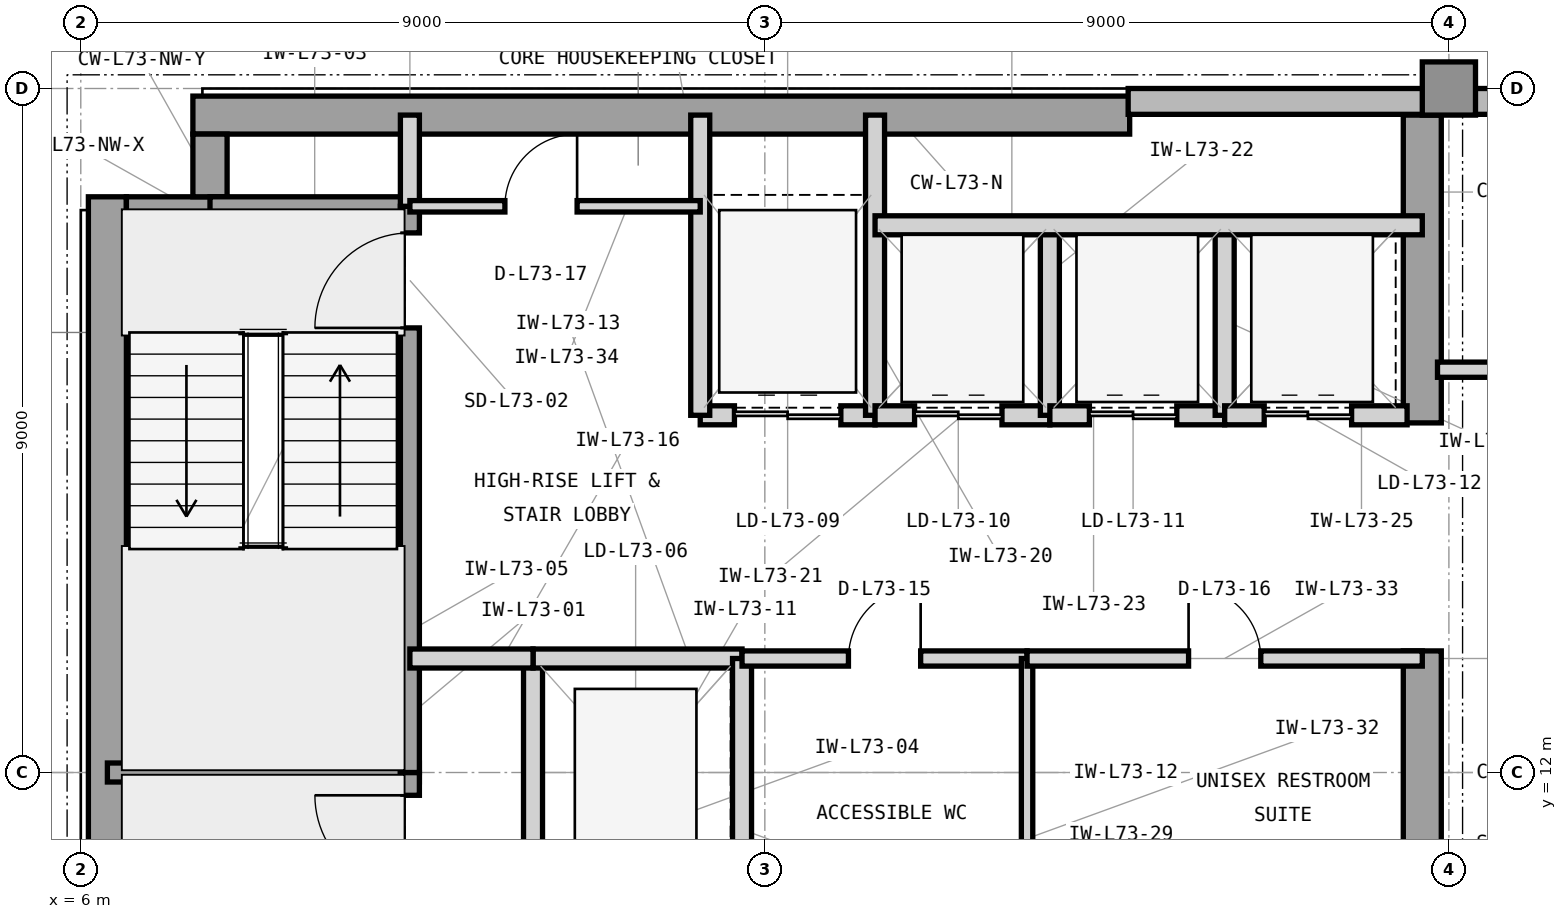
"""IFC4 building model, lengths in metres.
Left out: names, types, materials, properties, quantities, classifications, styles, units other than length and angle.
Written with IfcOpenShell. Run it as: python <this file> out.ifc"""

import sys

from ifc_helpers import new_model, si_unit, direction, frame, frame_2d, origin, origin_2d, place, context, subcontext, project, spatial, rectangle, extrude, element, fill, save


model = new_model("IFC4")
c1 = context("Model", 3, precision=1e-05, world=origin(), true_north=direction((0.0, 1.0)))
c2 = subcontext(c1, "Body", "Model", "MODEL_VIEW")
j1 = project(units=[si_unit("LENGTHUNIT", "METRE"), si_unit("PLANEANGLEUNIT", "RADIAN")], contexts=[c1])
p1 = place(None, origin())
s1 = spatial("IfcSite", under=j1, at=p1, CompositionType="ELEMENT")
p2 = place(p1, origin())
s2 = spatial("IfcBuilding", under=s1, at=p2, CompositionType="ELEMENT")
p3 = place(p2, frame((0.0, 0.0, 297.6)))
s3 = spatial("IfcBuildingStorey", under=s2, at=p3, CompositionType="ELEMENT", Elevation=297.6)
p4 = place(p3, frame((6.35, 4.425, 0.0), z_axis=(0.0, 0.0, 1.0), x_axis=(0.0, 1.0, 0.0)))
e1 = element("IfcWall", 1, at=p4, inside=s3, PredefinedType="SHEAR", context=c2, shape_type="SweptSolid", body=[
    extrude(rectangle(XDim=15.15, YDim=0.5, at=frame_2d((7.575, 0.0))), origin(), (0.0, 0.0, 1.0), 3.9),
])
p5 = place(p3, frame((7.475, 20.65, 0.0), z_axis=(0.0, 0.0, 1.0), x_axis=(1.0, 0.0, 0.0)))
e2 = element("IfcWall", 2, at=p5, inside=s3, PredefinedType="SHEAR", context=c2, shape_type="SweptSolid", body=[
    extrude(rectangle(XDim=12.325, YDim=0.5, at=frame_2d((6.163, 0.0))), origin(), (0.0, 0.0, 1.0), 3.9),
])
p6 = place(p3, frame((23.65, 10.4, 0.0), z_axis=(0.0, 0.0, 1.0), x_axis=(0.0, 1.0, 0.0)))
e3 = element("IfcWall", 3, at=p6, inside=s3, PredefinedType="SHEAR", context=c2, shape_type="SweptSolid", body=[
    extrude(rectangle(XDim=3.2, YDim=0.5, at=frame_2d((1.6, 0.0))), origin(), (0.0, 0.0, 1.0), 3.9),
])
p7 = place(p3, frame((23.65, 16.6, 0.0), z_axis=(0.0, 0.0, 1.0), x_axis=(0.0, 1.0, 0.0)))
e4 = element("IfcWall", 4, at=p7, inside=s3, PredefinedType="SHEAR", context=c2, shape_type="SweptSolid", body=[
    extrude(rectangle(XDim=4.05, YDim=0.5, at=frame_2d((2.025, 0.0))), origin(), (0.0, 0.0, 1.0), 3.9),
])
p8 = place(p3, frame((6.6, 19.35, 0.0), z_axis=(0.0, 0.0, 1.0), x_axis=(1.0, 0.0, 0.0)))
e5 = element("IfcWall", 5, at=p8, inside=s3, PredefinedType="SHEAR", context=c2, shape_type="SweptSolid", body=[
    extrude(rectangle(XDim=1.325, YDim=0.45, at=frame_2d((0.663, 0.0))), origin(), (0.0, 0.0, 1.0), 3.9),
])
p9 = place(p3, frame((7.7, 19.575, 0.0), z_axis=(0.0, 0.0, 1.0), x_axis=(0.0, 1.0, 0.0)))
e6 = element("IfcWall", 6, at=p9, inside=s3, PredefinedType="SHEAR", context=c2, shape_type="SweptSolid", body=[
    extrude(rectangle(XDim=0.825, YDim=0.45, at=frame_2d((0.413, 0.0))), origin(), (0.0, 0.0, 1.0), 3.9),
])
p10 = place(p3, frame((24.0, 21.0, 0.0), z_axis=(0.0, 0.0, 1.0), x_axis=(1.0, 0.0, 0.0)))
e7 = element("IfcColumn", 7, at=p10, inside=s3, PredefinedType="COLUMN", context=c2, shape_type="SweptSolid", body=[
    extrude(rectangle(XDim=0.7, YDim=0.7, at=origin_2d()), origin(), (0.0, 0.0, 1.0), 3.9),
])
p11 = place(p3, frame((49.4, 20.83, 0.0), z_axis=(0.0, 0.0, 1.0), x_axis=(-1.0, 0.0, 0.0)))
e8 = element("IfcWall", 8, at=p11, inside=s3, PredefinedType="STANDARD", context=c2, shape_type="SweptSolid", body=[
    extrude(rectangle(XDim=29.62, YDim=0.34, at=frame_2d((14.81, 0.0))), origin(), (0.0, 0.0, 1.0), 3.715),
])
p12 = place(p11, frame((11.042, 0.0, 0.8)))
e9 = element("IfcOpeningElement", 9, at=p12, cuts=e8, PredefinedType="OPENING", context=c2, shape_type="SweptSolid", body=[
    extrude(rectangle(XDim=2.6, YDim=2.35, at=frame_2d((1.3, 1.175))), frame((0.0, 0.18, 0.0), z_axis=(0.0, -1.0, 0.0), x_axis=(1.0, 0.0, 0.0)), (0.0, 0.0, 1.0), 0.36),
])
p13 = place(p11, frame((20.915, 0.0, 0.8)))
e10 = element("IfcOpeningElement", 10, at=p13, cuts=e8, PredefinedType="OPENING", context=c2, shape_type="SweptSolid", body=[
    extrude(rectangle(XDim=2.6, YDim=2.35, at=frame_2d((1.3, 1.175))), frame((0.0, 0.18, 0.0), z_axis=(0.0, -1.0, 0.0), x_axis=(1.0, 0.0, 0.0)), (0.0, 0.0, 1.0), 0.36),
])
p14 = place(p11, frame((8.375, 0.0, 0.8)))
e11 = element("IfcOpeningElement", 11, at=p14, cuts=e8, PredefinedType="OPENING", context=c2, shape_type="SweptSolid", body=[
    extrude(rectangle(XDim=1.2, YDim=2.35, at=frame_2d((0.6, 1.175))), frame((0.0, 0.18, 0.0), z_axis=(0.0, -1.0, 0.0), x_axis=(1.0, 0.0, 0.0)), (0.0, 0.0, 1.0), 0.36),
])
p15 = place(p3, frame((6.35, 12.0, 0.0), z_axis=(0.0, 0.0, 1.0), x_axis=(1.0, 0.0, 0.0)))
e12 = element("IfcWall", 12, at=p15, inside=s3, PredefinedType="SHEAR", context=c2, shape_type="SweptSolid", body=[
    extrude(rectangle(XDim=4.105, YDim=0.25, at=frame_2d((2.052, 0.0))), origin(), (0.0, 0.0, 1.0), 3.9),
])
p16 = place(p3, frame((7.7, 19.45, 0.0), z_axis=(0.0, 0.0, 1.0), x_axis=(1.0, 0.0, 0.0)))
e13 = element("IfcWall", 13, at=p16, inside=s3, PredefinedType="SHEAR", context=c2, shape_type="SweptSolid", body=[
    extrude(rectangle(XDim=2.755, YDim=0.25, at=frame_2d((1.377, 0.0))), origin(), (0.0, 0.0, 1.0), 3.9),
])
p17 = place(p3, frame((10.33, 4.55, 0.0), z_axis=(0.0, 0.0, 1.0), x_axis=(0.0, 1.0, 0.0)))
e14 = element("IfcWall", 14, at=p17, inside=s3, PredefinedType="SHEAR", context=c2, shape_type="SweptSolid", body=[
    extrude(rectangle(XDim=7.45, YDim=0.25, at=frame_2d((3.725, 0.0))), origin(), (0.0, 0.0, 1.0), 3.9),
])
p18 = place(p17, frame((5.9, 0.0, 0.0)))
e15 = element("IfcOpeningElement", 15, at=p18, cuts=e14, PredefinedType="OPENING", context=c2, shape_type="SweptSolid", body=[
    extrude(rectangle(XDim=1.25, YDim=2.2, at=frame_2d((0.625, 1.1))), frame((0.0, 0.135, 0.0), z_axis=(0.0, -1.0, 0.0), x_axis=(1.0, 0.0, 0.0)), (0.0, 0.0, 1.0), 0.27),
])
p19 = place(p3, frame((10.33, 12.0, 0.0), z_axis=(0.0, 0.0, 1.0), x_axis=(0.0, 1.0, 0.0)))
e16 = element("IfcWall", 16, at=p19, inside=s3, PredefinedType="SHEAR", context=c2, shape_type="SweptSolid", body=[
    extrude(rectangle(XDim=7.45, YDim=0.25, at=frame_2d((3.725, 0.0))), origin(), (0.0, 0.0, 1.0), 3.9),
])
p20 = place(p19, frame((5.85, 0.0, 0.0)))
e17 = element("IfcOpeningElement", 17, at=p20, cuts=e16, PredefinedType="OPENING", context=c2, shape_type="SweptSolid", body=[
    extrude(rectangle(XDim=1.25, YDim=2.2, at=frame_2d((0.625, 1.1))), frame((0.0, 0.135, 0.0), z_axis=(0.0, -1.0, 0.0), x_axis=(1.0, 0.0, 0.0)), (0.0, 0.0, 1.0), 0.27),
])
p21 = place(p3, frame((10.33, 19.45, 0.0), z_axis=(0.0, 0.0, 1.0), x_axis=(0.0, 1.0, 0.0)))
e18 = element("IfcWall", 18, at=p21, inside=s3, PredefinedType="PARTITIONING", context=c2, shape_type="SweptSolid", body=[
    extrude(rectangle(XDim=1.2, YDim=0.25, at=frame_2d((0.6, 0.0))), origin(), (0.0, 0.0, 1.0), 3.705),
])
p22 = place(p3, frame((11.95, 10.5, 0.0), z_axis=(0.0, 0.0, 1.0), x_axis=(0.0, 1.0, 0.0)))
e19 = element("IfcWall", 19, at=p22, inside=s3, PredefinedType="PARTITIONING", context=c2, shape_type="SweptSolid", body=[
    extrude(rectangle(XDim=3.0, YDim=0.25, at=frame_2d((1.5, 0.0))), origin(), (0.0, 0.0, 1.0), 3.705),
])
p23 = place(p3, frame((11.95, 13.5, 0.0), z_axis=(0.0, 0.0, 1.0), x_axis=(1.0, 0.0, 0.0)))
e20 = element("IfcWall", 20, at=p23, inside=s3, PredefinedType="PARTITIONING", context=c2, shape_type="SweptSolid", body=[
    extrude(rectangle(XDim=2.75, YDim=0.25, at=frame_2d((1.375, 0.0))), origin(), (0.0, 0.0, 1.0), 3.354),
])
p24 = place(p3, frame((14.7, 10.5, 0.0), z_axis=(0.0, 0.0, 1.0), x_axis=(0.0, 1.0, 0.0)))
e21 = element("IfcWall", 21, at=p24, inside=s3, PredefinedType="PARTITIONING", context=c2, shape_type="SweptSolid", body=[
    extrude(rectangle(XDim=3.0, YDim=0.25, at=frame_2d((1.5, 0.0))), origin(), (0.0, 0.0, 1.0), 3.705),
])
p25 = place(p3, frame((10.33, 13.5, 0.0), z_axis=(0.0, 0.0, 1.0), x_axis=(1.0, 0.0, 0.0)))
e22 = element("IfcWall", 22, at=p25, inside=s3, PredefinedType="PARTITIONING", context=c2, shape_type="SweptSolid", body=[
    extrude(rectangle(XDim=1.62, YDim=0.25, at=frame_2d((0.81, 0.0))), origin(), (0.0, 0.0, 1.0), 3.354),
])
p26 = place(p3, frame((14.15, 16.7, 0.0), z_axis=(0.0, 0.0, 1.0), x_axis=(1.0, 0.0, 0.0)))
e23 = element("IfcWall", 23, at=p26, inside=s3, PredefinedType="PARTITIONING", context=c2, shape_type="SweptSolid", body=[
    extrude(rectangle(XDim=2.3, YDim=0.25, at=frame_2d((1.15, 0.0))), origin(), (0.0, 0.0, 1.0), 3.354),
])
p27 = place(p26, frame((0.45, 0.0, 0.0)))
e24 = element("IfcOpeningElement", 24, at=p27, cuts=e23, PredefinedType="OPENING", context=c2, shape_type="SweptSolid", body=[
    extrude(rectangle(XDim=1.4, YDim=2.35, at=frame_2d((0.7, 1.175))), frame((0.0, 0.135, 0.0), z_axis=(0.0, -1.0, 0.0), x_axis=(1.0, 0.0, 0.0)), (0.0, 0.0, 1.0), 0.27),
])
for number, where, z_axis, x_axis in (
    (25, (14.15, 16.7, 0.0), (0.0, 0.0, 1.0), (0.0, 1.0, 0.0)),
    (26, (16.45, 16.7, 0.0), (0.0, 0.0, 1.0), (0.0, 1.0, 0.0)),
):
    element("IfcWall", number, at=place(p3, frame(where, z_axis=z_axis, x_axis=x_axis)), inside=s3, PredefinedType="PARTITIONING", context=c2, shape_type="SweptSolid", body=[
        extrude(rectangle(XDim=3.95, YDim=0.25, at=frame_2d((1.975, 0.0))), origin(), (0.0, 0.0, 1.0), 3.705),
    ])
p28 = place(p3, frame((16.45, 16.7, 0.0), z_axis=(0.0, 0.0, 1.0), x_axis=(1.0, 0.0, 0.0)))
e27 = element("IfcWall", 27, at=p28, inside=s3, PredefinedType="PARTITIONING", context=c2, shape_type="SweptSolid", body=[
    extrude(rectangle(XDim=2.3, YDim=0.25, at=frame_2d((1.15, 0.0))), origin(), (0.0, 0.0, 1.0), 3.354),
])
p29 = place(p28, frame((0.52, 0.0, 0.0)))
e28 = element("IfcOpeningElement", 28, at=p29, cuts=e27, PredefinedType="OPENING", context=c2, shape_type="SweptSolid", body=[
    extrude(rectangle(XDim=1.15, YDim=2.25, at=frame_2d((0.575, 1.125))), frame((0.0, 0.135, 0.0), z_axis=(0.0, -1.0, 0.0), x_axis=(1.0, 0.0, 0.0)), (0.0, 0.0, 1.0), 0.27),
])
p30 = place(p3, frame((18.75, 16.7, 0.0), z_axis=(0.0, 0.0, 1.0), x_axis=(0.0, 1.0, 0.0)))
e29 = element("IfcWall", 29, at=p30, inside=s3, PredefinedType="PARTITIONING", context=c2, shape_type="SweptSolid", body=[
    extrude(rectangle(XDim=2.5, YDim=0.25, at=frame_2d((1.25, 0.0))), origin(), (0.0, 0.0, 1.0), 3.705),
])
p31 = place(p3, frame((18.75, 16.7, 0.0), z_axis=(0.0, 0.0, 1.0), x_axis=(1.0, 0.0, 0.0)))
e30 = element("IfcWall", 30, at=p31, inside=s3, PredefinedType="PARTITIONING", context=c2, shape_type="SweptSolid", body=[
    extrude(rectangle(XDim=2.3, YDim=0.25, at=frame_2d((1.15, 0.0))), origin(), (0.0, 0.0, 1.0), 3.354),
])
p32 = place(p31, frame((0.52, 0.0, 0.0)))
e31 = element("IfcOpeningElement", 31, at=p32, cuts=e30, PredefinedType="OPENING", context=c2, shape_type="SweptSolid", body=[
    extrude(rectangle(XDim=1.15, YDim=2.25, at=frame_2d((0.575, 1.125))), frame((0.0, 0.135, 0.0), z_axis=(0.0, -1.0, 0.0), x_axis=(1.0, 0.0, 0.0)), (0.0, 0.0, 1.0), 0.27),
])
p33 = place(p3, frame((21.05, 16.7, 0.0), z_axis=(0.0, 0.0, 1.0), x_axis=(0.0, 1.0, 0.0)))
e32 = element("IfcWall", 32, at=p33, inside=s3, PredefinedType="PARTITIONING", context=c2, shape_type="SweptSolid", body=[
    extrude(rectangle(XDim=2.5, YDim=0.25, at=frame_2d((1.25, 0.0))), origin(), (0.0, 0.0, 1.0), 3.705),
])
p34 = place(p3, frame((21.05, 16.7, 0.0), z_axis=(0.0, 0.0, 1.0), x_axis=(1.0, 0.0, 0.0)))
e33 = element("IfcWall", 33, at=p34, inside=s3, PredefinedType="PARTITIONING", context=c2, shape_type="SweptSolid", body=[
    extrude(rectangle(XDim=2.4, YDim=0.25, at=frame_2d((1.2, 0.0))), origin(), (0.0, 0.0, 1.0), 3.354),
])
p35 = place(p34, frame((0.52, 0.0, 0.0)))
e34 = element("IfcOpeningElement", 34, at=p35, cuts=e33, PredefinedType="OPENING", context=c2, shape_type="SweptSolid", body=[
    extrude(rectangle(XDim=1.15, YDim=2.25, at=frame_2d((0.575, 1.125))), frame((0.0, 0.135, 0.0), z_axis=(0.0, -1.0, 0.0), x_axis=(1.0, 0.0, 0.0)), (0.0, 0.0, 1.0), 0.27),
])
p36 = place(p3, frame((16.45, 19.2, 0.0), z_axis=(0.0, 0.0, 1.0), x_axis=(1.0, 0.0, 0.0)))
e35 = element("IfcWall", 35, at=p36, inside=s3, PredefinedType="PARTITIONING", context=c2, shape_type="SweptSolid", body=[
    extrude(rectangle(XDim=7.2, YDim=0.25, at=frame_2d((3.6, 0.0))), origin(), (0.0, 0.0, 1.0), 3.705),
])
p37 = place(p3, frame((14.7, 13.5, 0.0), z_axis=(0.0, 0.0, 1.0), x_axis=(1.0, 0.0, 0.0)))
e36 = element("IfcWall", 36, at=p37, inside=s3, PredefinedType="PARTITIONING", context=c2, shape_type="SweptSolid", body=[
    extrude(rectangle(XDim=3.75, YDim=0.2, at=frame_2d((1.875, 0.0))), origin(), (0.0, 0.0, 1.0), 3.354),
])
p38 = place(p37, frame((1.4, 0.0, 0.0)))
e37 = element("IfcOpeningElement", 37, at=p38, cuts=e36, PredefinedType="OPENING", context=c2, shape_type="SweptSolid", body=[
    extrude(rectangle(XDim=0.95, YDim=2.1, at=frame_2d((0.475, 1.05))), frame((0.0, 0.11, 0.0), z_axis=(0.0, -1.0, 0.0), x_axis=(1.0, 0.0, 0.0)), (0.0, 0.0, 1.0), 0.22),
])
p39 = place(p3, frame((18.45, 10.34, 0.0), z_axis=(0.0, 0.0, 1.0), x_axis=(0.0, 1.0, 0.0)))
e38 = element("IfcWall", 38, at=p39, inside=s3, PredefinedType="PARTITIONING", context=c2, shape_type="SweptSolid", body=[
    extrude(rectangle(XDim=3.16, YDim=0.15, at=frame_2d((1.58, 0.0))), origin(), (0.0, 0.0, 1.0), 3.705),
])
p40 = place(p3, frame((18.45, 13.5, 0.0), z_axis=(0.0, 0.0, 1.0), x_axis=(1.0, 0.0, 0.0)))
e39 = element("IfcWall", 39, at=p40, inside=s3, PredefinedType="PARTITIONING", context=c2, shape_type="SweptSolid", body=[
    extrude(rectangle(XDim=5.2, YDim=0.2, at=frame_2d((2.6, 0.0))), origin(), (0.0, 0.0, 1.0), 3.354),
])
p41 = place(p40, frame((2.125, 0.0, 0.0)))
e40 = element("IfcOpeningElement", 40, at=p41, cuts=e39, PredefinedType="OPENING", context=c2, shape_type="SweptSolid", body=[
    extrude(rectangle(XDim=0.95, YDim=2.1, at=frame_2d((0.475, 1.05))), frame((0.0, 0.11, 0.0), z_axis=(0.0, -1.0, 0.0), x_axis=(1.0, 0.0, 0.0)), (0.0, 0.0, 1.0), 0.22),
])
p42 = place(p3, frame((10.33, 19.45, 0.0), z_axis=(0.0, 0.0, 1.0), x_axis=(1.0, 0.0, 0.0)))
e41 = element("IfcWall", 41, at=p42, inside=s3, PredefinedType="PARTITIONING", context=c2, shape_type="SweptSolid", body=[
    extrude(rectangle(XDim=3.82, YDim=0.15, at=frame_2d((1.91, 0.0))), origin(), (0.0, 0.0, 1.0), 3.705),
])
p43 = place(p42, frame((1.25, 0.0, 0.0)))
e42 = element("IfcOpeningElement", 42, at=p43, cuts=e41, PredefinedType="OPENING", context=c2, shape_type="SweptSolid", body=[
    extrude(rectangle(XDim=0.95, YDim=2.1, at=frame_2d((0.475, 1.05))), frame((0.0, 0.085, 0.0), z_axis=(0.0, -1.0, 0.0), x_axis=(1.0, 0.0, 0.0)), (0.0, 0.0, 1.0), 0.17),
])
p44 = place(p3, frame((23.85, 17.3, 0.0), z_axis=(0.0, 0.0, 1.0), x_axis=(1.0, 0.0, 0.0)))
e43 = element("IfcWall", 43, at=p44, inside=s3, PredefinedType="PARTITIONING", context=c2, shape_type="SweptSolid", body=[
    extrude(rectangle(XDim=7.35, YDim=0.2, at=frame_2d((3.675, 0.0))), origin(), (0.0, 0.0, 1.0), 3.705),
])
p45 = place(p44, frame((2.8, 0.0, 0.0)))
e44 = element("IfcOpeningElement", 44, at=p45, cuts=e43, PredefinedType="OPENING", context=c2, shape_type="SweptSolid", body=[
    extrude(rectangle(XDim=1.0, YDim=2.15, at=frame_2d((0.5, 1.075))), frame((0.0, 0.11, 0.0), z_axis=(0.0, -1.0, 0.0), x_axis=(1.0, 0.0, 0.0)), (0.0, 0.0, 1.0), 0.22),
])
p46 = place(p18, origin())
e45 = element("IfcDoor", 45, at=p46, inside=s3, OperationType="SINGLE_SWING_RIGHT", PredefinedType="DOOR", context=c2, shape_type="SweptSolid", body=[
    extrude(rectangle(XDim=1.25, YDim=2.2, at=frame_2d((0.625, 1.1))), frame((0.0, 0.025, 0.0), z_axis=(0.0, -1.0, 0.0), x_axis=(1.0, 0.0, 0.0)), (0.0, 0.0, 1.0), 0.05),
])
fill(e15, e45)
p47 = place(p20, origin())
e46 = element("IfcDoor", 46, at=p47, inside=s3, OperationType="SINGLE_SWING_LEFT", PredefinedType="DOOR", context=c2, shape_type="SweptSolid", body=[
    extrude(rectangle(XDim=1.25, YDim=2.2, at=frame_2d((0.625, 1.1))), frame((0.0, 0.025, 0.0), z_axis=(0.0, -1.0, 0.0), x_axis=(1.0, 0.0, 0.0)), (0.0, 0.0, 1.0), 0.05),
])
fill(e17, e46)
p48 = place(p27, origin())
e47 = element("IfcDoor", 47, at=p48, inside=s3, OperationType="DOUBLE_DOOR_SLIDING", PredefinedType="DOOR", context=c2, shape_type="SweptSolid", body=[
    extrude(rectangle(XDim=1.4, YDim=2.35, at=frame_2d((0.7, 1.175))), frame((0.0, 0.025, 0.0), z_axis=(0.0, -1.0, 0.0), x_axis=(1.0, 0.0, 0.0)), (0.0, 0.0, 1.0), 0.05),
])
fill(e24, e47)
p49 = place(p29, origin())
e48 = element("IfcDoor", 48, at=p49, inside=s3, OperationType="DOUBLE_DOOR_SLIDING", PredefinedType="DOOR", context=c2, shape_type="SweptSolid", body=[
    extrude(rectangle(XDim=1.15, YDim=2.25, at=frame_2d((0.575, 1.125))), frame((0.0, 0.025, 0.0), z_axis=(0.0, -1.0, 0.0), x_axis=(1.0, 0.0, 0.0)), (0.0, 0.0, 1.0), 0.05),
])
fill(e28, e48)
p50 = place(p32, origin())
e49 = element("IfcDoor", 49, at=p50, inside=s3, OperationType="DOUBLE_DOOR_SLIDING", PredefinedType="DOOR", context=c2, shape_type="SweptSolid", body=[
    extrude(rectangle(XDim=1.15, YDim=2.25, at=frame_2d((0.575, 1.125))), frame((0.0, 0.025, 0.0), z_axis=(0.0, -1.0, 0.0), x_axis=(1.0, 0.0, 0.0)), (0.0, 0.0, 1.0), 0.05),
])
fill(e31, e49)
p51 = place(p35, origin())
e50 = element("IfcDoor", 50, at=p51, inside=s3, OperationType="DOUBLE_DOOR_SLIDING", PredefinedType="DOOR", context=c2, shape_type="SweptSolid", body=[
    extrude(rectangle(XDim=1.15, YDim=2.25, at=frame_2d((0.575, 1.125))), frame((0.0, 0.025, 0.0), z_axis=(0.0, -1.0, 0.0), x_axis=(1.0, 0.0, 0.0)), (0.0, 0.0, 1.0), 0.05),
])
fill(e34, e50)
p52 = place(p38, origin())
e51 = element("IfcDoor", 51, at=p52, inside=s3, OperationType="SINGLE_SWING_RIGHT", PredefinedType="DOOR", context=c2, shape_type="SweptSolid", body=[
    extrude(rectangle(XDim=0.95, YDim=2.1, at=frame_2d((0.475, 1.05))), frame((0.0, 0.025, 0.0), z_axis=(0.0, -1.0, 0.0), x_axis=(1.0, 0.0, 0.0)), (0.0, 0.0, 1.0), 0.05),
])
fill(e37, e51)
p53 = place(p41, origin())
e52 = element("IfcDoor", 52, at=p53, inside=s3, OperationType="SINGLE_SWING_LEFT", PredefinedType="DOOR", context=c2, shape_type="SweptSolid", body=[
    extrude(rectangle(XDim=0.95, YDim=2.1, at=frame_2d((0.475, 1.05))), frame((0.0, 0.025, 0.0), z_axis=(0.0, -1.0, 0.0), x_axis=(1.0, 0.0, 0.0)), (0.0, 0.0, 1.0), 0.05),
])
fill(e40, e52)
p54 = place(p43, origin())
e53 = element("IfcDoor", 53, at=p54, inside=s3, OperationType="SINGLE_SWING_RIGHT", PredefinedType="DOOR", context=c2, shape_type="SweptSolid", body=[
    extrude(rectangle(XDim=0.95, YDim=2.1, at=frame_2d((0.475, 1.05))), frame((0.0, 0.025, 0.0), z_axis=(0.0, -1.0, 0.0), x_axis=(1.0, 0.0, 0.0)), (0.0, 0.0, 1.0), 0.05),
])
fill(e42, e53)
save(model, sys.argv[1])
